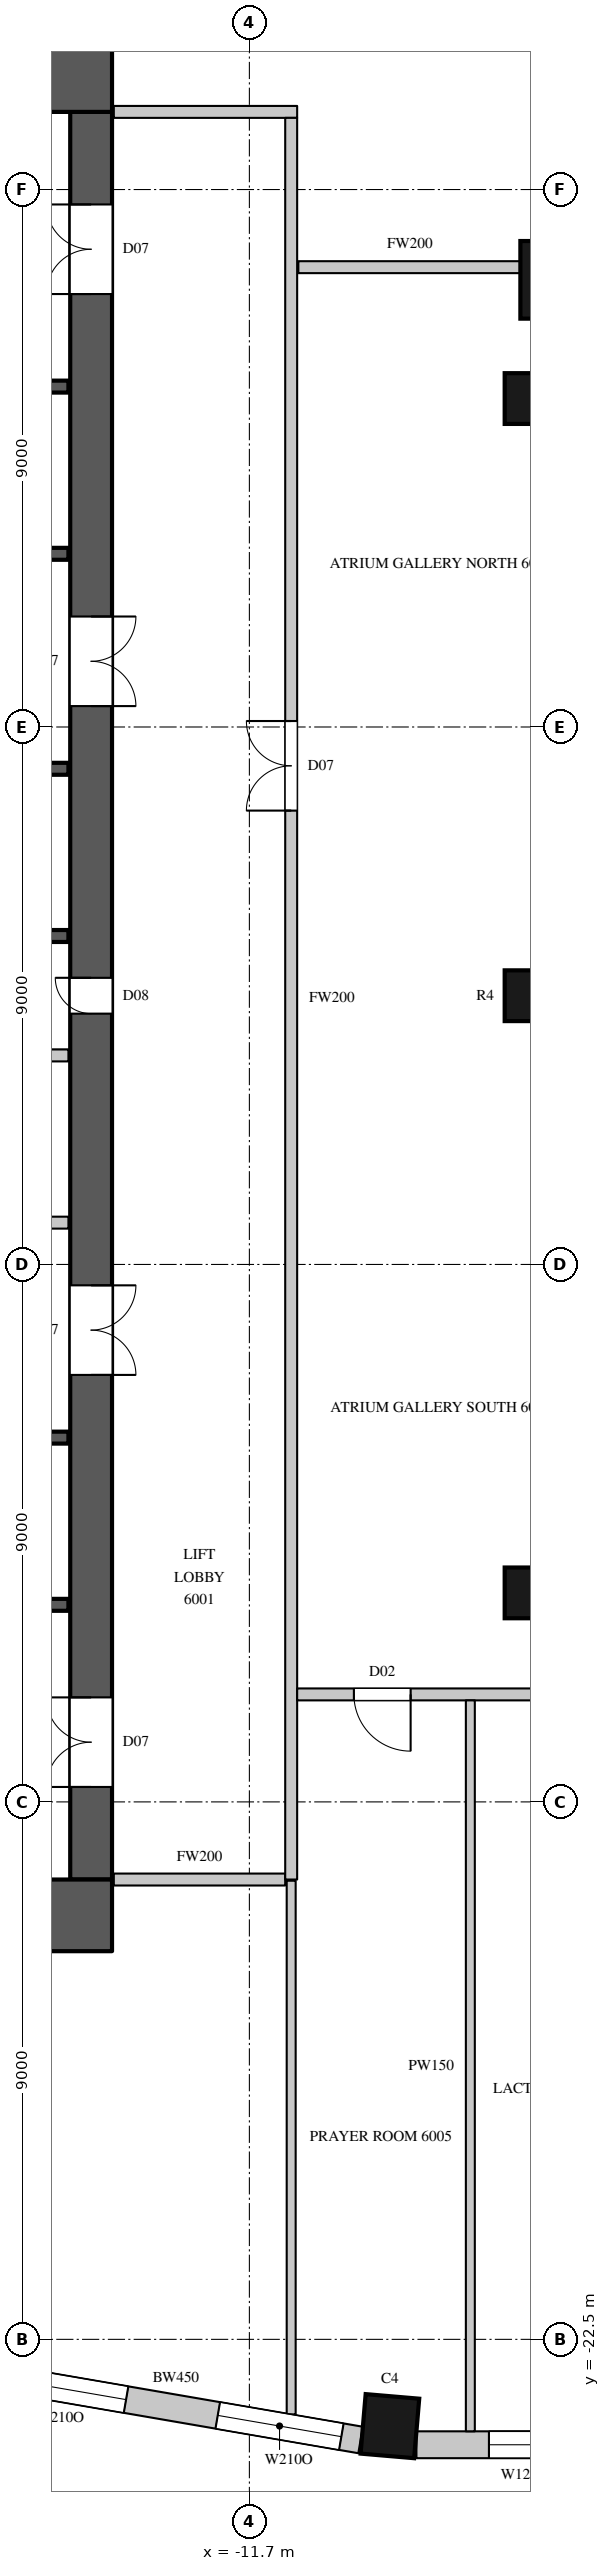
"""IFC4 building model, lengths in metres.
Left out: names, types, materials, properties, quantities, classifications, styles, units other than length and angle.
Written with IfcOpenShell. Run it as: python <this file> out.ifc"""

import sys

from ifc_helpers import new_model, si_unit, direction, frame, frame_2d, origin, origin_2d, place, context, subcontext, project, spatial, rectangle, circle, extrude, element, fill, save


model = new_model("IFC4")
c1 = context("Model", 3, precision=1e-05, world=origin(), true_north=direction((0.0, 1.0)))
c2 = subcontext(c1, "Body", "Model", "MODEL_VIEW")
j1 = project(units=[si_unit("LENGTHUNIT", "METRE"), si_unit("PLANEANGLEUNIT", "RADIAN")], contexts=[c1])
p1 = place(None, origin())
s1 = spatial("IfcSite", under=j1, at=p1, CompositionType="ELEMENT")
p2 = place(p1, origin())
s2 = spatial("IfcBuilding", under=s1, at=p2, CompositionType="ELEMENT")
p3 = place(p2, frame((0.0, 0.0, 268.0)))
s3 = spatial("IfcBuildingStorey", under=s2, at=p3, CompositionType="ELEMENT", Elevation=268.0)
p4 = place(p3, frame((-6.512, 11.988, 0.0), z_axis=(0.0, 0.0, 1.0), x_axis=(1.0, 0.0, 0.0)))
e1 = element("IfcColumn", 1, at=p4, inside=s3, PredefinedType="COLUMN", context=c2, shape_type="SweptSolid", body=[
    extrude(circle(Radius=0.65, at=origin_2d()), origin(), (0.0, 0.0, 1.0), 4.1),
])
p5 = place(p3, frame((-9.347, -23.954, 0.0), z_axis=(0.0, 0.0, 1.0), x_axis=(0.996368206733, -0.085149260784, 0.0)))
e2 = element("IfcColumn", 2, at=p5, inside=s3, PredefinedType="COLUMN", context=c2, shape_type="SweptSolid", body=[
    extrude(rectangle(XDim=0.9, YDim=1.0, at=origin_2d()), origin(), (0.0, 0.0, 1.0), 4.1),
])
for number, where, z_axis, x_axis in (
    (3, (-7.0, -10.0, 0.0), (0.0, 0.0, 1.0), (1.0, 0.0, 0.0)),
    (4, (-7.0, 0.0, 0.0), (0.0, 0.0, 1.0), (1.0, 0.0, 0.0)),
    (5, (-7.0, 10.0, 0.0), (0.0, 0.0, 1.0), (1.0, 0.0, 0.0)),
):
    element("IfcColumn", number, at=place(p3, frame(where, z_axis=z_axis, x_axis=x_axis)), inside=s3, PredefinedType="COLUMN", context=c2, shape_type="SweptSolid", body=[
        extrude(circle(Radius=0.425, at=origin_2d()), origin(), (0.0, 0.0, 1.0), 4.1),
    ])
p6 = place(p3, frame((-16.157, -23.097, 0.0), z_axis=(0.0, 0.0, 1.0), x_axis=(0.985502073964, -0.169663379113, 0.0)))
e6 = element("IfcWall", 6, at=p6, inside=s3, PredefinedType="SOLIDWALL", context=c2, shape_type="SweptSolid", body=[
    extrude(rectangle(XDim=6.412, YDim=0.45, at=frame_2d((3.206, 0.0))), origin(), (0.0, 0.0, 1.0), 3.8),
])
p7 = place(p6, frame((0.327, 0.0, 1.05)))
e7 = element("IfcOpeningElement", 7, at=p7, cuts=e6, PredefinedType="OPENING", context=c2, shape_type="SweptSolid", body=[
    extrude(rectangle(XDim=2.1, YDim=2.4, at=frame_2d((1.05, 1.2))), frame((0.0, 0.235, 0.0), z_axis=(0.0, -1.0, 0.0), x_axis=(1.0, 0.0, 0.0)), (0.0, 0.0, 1.0), 0.47),
])
p8 = place(p6, frame((3.985, 0.0, 1.05)))
e8 = element("IfcOpeningElement", 8, at=p8, cuts=e6, PredefinedType="OPENING", context=c2, shape_type="SweptSolid", body=[
    extrude(rectangle(XDim=2.1, YDim=2.4, at=frame_2d((1.05, 1.2))), frame((0.0, 0.235, 0.0), z_axis=(0.0, -1.0, 0.0), x_axis=(1.0, 0.0, 0.0)), (0.0, 0.0, 1.0), 0.47),
])
p9 = place(p3, frame((-8.903, -24.265, 0.0), z_axis=(0.0, 0.0, 1.0), x_axis=(1.0, 0.0, 0.0)))
e9 = element("IfcWall", 9, at=p9, inside=s3, PredefinedType="SOLIDWALL", context=c2, shape_type="SweptSolid", body=[
    extrude(rectangle(XDim=6.406, YDim=0.45, at=frame_2d((3.203, 0.0))), origin(), (0.0, 0.0, 1.0), 3.8),
])
p10 = place(p9, frame((3.98, 0.0, 1.05)))
e10 = element("IfcOpeningElement", 10, at=p10, cuts=e9, PredefinedType="OPENING", context=c2, shape_type="SweptSolid", body=[
    extrude(rectangle(XDim=2.1, YDim=2.4, at=frame_2d((1.05, 1.2))), frame((0.0, 0.235, 0.0), z_axis=(0.0, -1.0, 0.0), x_axis=(1.0, 0.0, 0.0)), (0.0, 0.0, 1.0), 0.47),
])
p11 = place(p9, frame((1.214, 0.0, 1.05)))
e11 = element("IfcOpeningElement", 11, at=p11, cuts=e9, PredefinedType="OPENING", context=c2, shape_type="SweptSolid", body=[
    extrude(rectangle(XDim=1.2, YDim=2.4, at=frame_2d((0.6, 1.2))), frame((0.0, 0.235, 0.0), z_axis=(0.0, -1.0, 0.0), x_axis=(1.0, 0.0, 0.0)), (0.0, 0.0, 1.0), 0.47),
])
for number, where, z_axis, x_axis in (
    (12, (-30.0, 15.4, 0.0), (0.0, 0.0, 1.0), (1.0, 0.0, 0.0)),
    (13, (-30.0, -15.4, 0.0), (0.0, 0.0, 1.0), (1.0, 0.0, 0.0)),
):
    element("IfcWall", number, at=place(p3, frame(where, z_axis=z_axis, x_axis=x_axis)), inside=s3, PredefinedType="SHEAR", context=c2, shape_type="SweptSolid", body=[
        extrude(rectangle(XDim=16.0, YDim=1.2, at=frame_2d((8.0, 0.0))), origin(), (0.0, 0.0, 1.0), 4.1),
    ])
p12 = place(p3, frame((-14.35, -14.8, 0.0), z_axis=(0.0, 0.0, 1.0), x_axis=(0.0, 1.0, 0.0)))
e14 = element("IfcWall", 14, at=p12, inside=s3, PredefinedType="SHEAR", context=c2, shape_type="SweptSolid", body=[
    extrude(rectangle(XDim=29.6, YDim=0.7, at=frame_2d((14.8, 0.0))), origin(), (0.0, 0.0, 1.0), 4.1),
])
p13 = place(p12, frame((1.55, 0.0, 0.0)))
e15 = element("IfcOpeningElement", 15, at=p13, cuts=e14, PredefinedType="OPENING", context=c2, shape_type="SweptSolid", body=[
    extrude(rectangle(XDim=1.5, YDim=2.4, at=frame_2d((0.75, 1.2))), frame((0.0, 0.36, 0.0), z_axis=(0.0, -1.0, 0.0), x_axis=(1.0, 0.0, 0.0)), (0.0, 0.0, 1.0), 0.72),
])
p14 = place(p12, frame((26.55, 0.0, 0.0)))
e16 = element("IfcOpeningElement", 16, at=p14, cuts=e14, PredefinedType="OPENING", context=c2, shape_type="SweptSolid", body=[
    extrude(rectangle(XDim=1.5, YDim=2.4, at=frame_2d((0.75, 1.2))), frame((0.0, 0.36, 0.0), z_axis=(0.0, -1.0, 0.0), x_axis=(1.0, 0.0, 0.0)), (0.0, 0.0, 1.0), 0.72),
])
p15 = place(p12, frame((8.45, 0.0, 0.0)))
e17 = element("IfcOpeningElement", 17, at=p15, cuts=e14, PredefinedType="OPENING", context=c2, shape_type="SweptSolid", body=[
    extrude(rectangle(XDim=1.5, YDim=2.4, at=frame_2d((0.75, 1.2))), frame((0.0, 0.36, 0.0), z_axis=(0.0, -1.0, 0.0), x_axis=(1.0, 0.0, 0.0)), (0.0, 0.0, 1.0), 0.72),
])
p16 = place(p12, frame((19.65, 0.0, 0.0)))
e18 = element("IfcOpeningElement", 18, at=p16, cuts=e14, PredefinedType="OPENING", context=c2, shape_type="SweptSolid", body=[
    extrude(rectangle(XDim=1.5, YDim=2.4, at=frame_2d((0.75, 1.2))), frame((0.0, 0.36, 0.0), z_axis=(0.0, -1.0, 0.0), x_axis=(1.0, 0.0, 0.0)), (0.0, 0.0, 1.0), 0.72),
])
p17 = place(p12, frame((14.5, 0.0, 0.0)))
e19 = element("IfcOpeningElement", 19, at=p17, cuts=e14, PredefinedType="OPENING", context=c2, shape_type="SweptSolid", body=[
    extrude(rectangle(XDim=0.6, YDim=2.0, at=frame_2d((0.3, 1.0))), frame((0.0, 0.36, 0.0), z_axis=(0.0, -1.0, 0.0), x_axis=(1.0, 0.0, 0.0)), (0.0, 0.0, 1.0), 0.72),
])
p18 = place(p3, frame((-29.27, -3.8, 0.0), z_axis=(0.0, 0.0, 1.0), x_axis=(1.0, 0.0, 0.0)))
e20 = element("IfcWall", 20, at=p18, inside=s3, PredefinedType="PARTITIONING", context=c2, shape_type="SweptSolid", body=[
    extrude(rectangle(XDim=14.54, YDim=0.2, at=frame_2d((7.27, 0.0))), origin(), (0.0, 0.0, 1.0), 3.8),
])
p19 = place(p18, frame((0.8, 0.0, 0.0)))
e21 = element("IfcOpeningElement", 21, at=p19, cuts=e20, PredefinedType="OPENING", context=c2, shape_type="SweptSolid", body=[
    extrude(rectangle(XDim=0.9, YDim=2.2, at=frame_2d((0.45, 1.1))), frame((0.0, 0.11, 0.0), z_axis=(0.0, -1.0, 0.0), x_axis=(1.0, 0.0, 0.0)), (0.0, 0.0, 1.0), 0.22),
])
p20 = place(p18, frame((3.8, 0.0, 0.0)))
e22 = element("IfcOpeningElement", 22, at=p20, cuts=e20, PredefinedType="OPENING", context=c2, shape_type="SweptSolid", body=[
    extrude(rectangle(XDim=0.9, YDim=2.2, at=frame_2d((0.45, 1.1))), frame((0.0, 0.11, 0.0), z_axis=(0.0, -1.0, 0.0), x_axis=(1.0, 0.0, 0.0)), (0.0, 0.0, 1.0), 0.22),
])
p21 = place(p18, frame((8.25, 0.0, 0.0)))
e23 = element("IfcOpeningElement", 23, at=p21, cuts=e20, PredefinedType="OPENING", context=c2, shape_type="SweptSolid", body=[
    extrude(rectangle(XDim=0.9, YDim=2.2, at=frame_2d((0.45, 1.1))), frame((0.0, 0.11, 0.0), z_axis=(0.0, -1.0, 0.0), x_axis=(1.0, 0.0, 0.0)), (0.0, 0.0, 1.0), 0.22),
])
p22 = place(p18, frame((12.35, 0.0, 0.0)))
e24 = element("IfcOpeningElement", 24, at=p22, cuts=e20, PredefinedType="OPENING", context=c2, shape_type="SweptSolid", body=[
    extrude(rectangle(XDim=0.9, YDim=2.2, at=frame_2d((0.45, 1.1))), frame((0.0, 0.11, 0.0), z_axis=(0.0, -1.0, 0.0), x_axis=(1.0, 0.0, 0.0)), (0.0, 0.0, 1.0), 0.22),
])
p23 = place(p3, frame((-13.97, -14.8, 0.0), z_axis=(0.0, 0.0, 1.0), x_axis=(1.0, 0.0, 0.0)))
e25 = element("IfcWall", 25, at=p23, inside=s3, PredefinedType="PARTITIONING", context=c2, shape_type="SweptSolid", body=[
    extrude(rectangle(XDim=2.87, YDim=0.2, at=frame_2d((1.435, 0.0))), origin(), (0.0, 0.0, 1.0), 3.8),
])
p24 = place(p3, frame((-13.97, 14.8, 0.0), z_axis=(0.0, 0.0, 1.0), x_axis=(1.0, 0.0, 0.0)))
e26 = element("IfcWall", 26, at=p24, inside=s3, PredefinedType="PARTITIONING", context=c2, shape_type="SweptSolid", body=[
    extrude(rectangle(XDim=3.07, YDim=0.2, at=frame_2d((1.535, 0.0))), origin(), (0.0, 0.0, 1.0), 3.8),
])
p25 = place(p3, frame((-11.0, -14.8, 0.0), z_axis=(0.0, 0.0, 1.0), x_axis=(0.0, 1.0, 0.0)))
e27 = element("IfcWall", 27, at=p25, inside=s3, PredefinedType="PARTITIONING", context=c2, shape_type="SweptSolid", body=[
    extrude(rectangle(XDim=29.5, YDim=0.2, at=frame_2d((14.75, 0.0))), origin(), (0.0, 0.0, 1.0), 3.8),
])
p26 = place(p25, frame((17.9, 0.0, 0.0)))
e28 = element("IfcOpeningElement", 28, at=p26, cuts=e27, PredefinedType="OPENING", context=c2, shape_type="SweptSolid", body=[
    extrude(rectangle(XDim=1.5, YDim=2.4, at=frame_2d((0.75, 1.2))), frame((0.0, 0.11, 0.0), z_axis=(0.0, -1.0, 0.0), x_axis=(1.0, 0.0, 0.0)), (0.0, 0.0, 1.0), 0.22),
])
p27 = place(p3, frame((-10.9, -11.7, 0.0), z_axis=(0.0, 0.0, 1.0), x_axis=(1.0, 0.0, 0.0)))
e29 = element("IfcWall", 29, at=p27, inside=s3, PredefinedType="PARTITIONING", context=c2, shape_type="SweptSolid", body=[
    extrude(rectangle(XDim=21.5, YDim=0.2, at=frame_2d((10.75, 0.0))), origin(), (0.0, 0.0, 1.0), 3.8),
])
p28 = place(p27, frame((0.95, 0.0, 0.0)))
e30 = element("IfcOpeningElement", 30, at=p28, cuts=e29, PredefinedType="OPENING", context=c2, shape_type="SweptSolid", body=[
    extrude(rectangle(XDim=0.95, YDim=2.2, at=frame_2d((0.475, 1.1))), frame((0.0, 0.11, 0.0), z_axis=(0.0, -1.0, 0.0), x_axis=(1.0, 0.0, 0.0)), (0.0, 0.0, 1.0), 0.22),
])
p29 = place(p27, frame((4.2, 0.0, 0.0)))
e31 = element("IfcOpeningElement", 31, at=p29, cuts=e29, PredefinedType="OPENING", context=c2, shape_type="SweptSolid", body=[
    extrude(rectangle(XDim=0.9, YDim=2.2, at=frame_2d((0.45, 1.1))), frame((0.0, 0.11, 0.0), z_axis=(0.0, -1.0, 0.0), x_axis=(1.0, 0.0, 0.0)), (0.0, 0.0, 1.0), 0.22),
])
p30 = place(p27, frame((6.85, 0.0, 0.0)))
e32 = element("IfcOpeningElement", 32, at=p30, cuts=e29, PredefinedType="OPENING", context=c2, shape_type="SweptSolid", body=[
    extrude(rectangle(XDim=1.1, YDim=2.4, at=frame_2d((0.55, 1.2))), frame((0.0, 0.11, 0.0), z_axis=(0.0, -1.0, 0.0), x_axis=(1.0, 0.0, 0.0)), (0.0, 0.0, 1.0), 0.22),
])
p31 = place(p27, frame((9.95, 0.0, 0.0)))
e33 = element("IfcOpeningElement", 33, at=p31, cuts=e29, PredefinedType="OPENING", context=c2, shape_type="SweptSolid", body=[
    extrude(rectangle(XDim=1.1, YDim=2.4, at=frame_2d((0.55, 1.2))), frame((0.0, 0.11, 0.0), z_axis=(0.0, -1.0, 0.0), x_axis=(1.0, 0.0, 0.0)), (0.0, 0.0, 1.0), 0.22),
])
p32 = place(p3, frame((-10.88, 12.2, 0.0), z_axis=(0.0, 0.0, 1.0), x_axis=(1.0, 0.0, 0.0)))
e34 = element("IfcWall", 34, at=p32, inside=s3, PredefinedType="PARTITIONING", context=c2, shape_type="SweptSolid", body=[
    extrude(rectangle(XDim=3.736, YDim=0.2, at=frame_2d((1.868, 0.0))), origin(), (0.0, 0.0, 1.0), 3.8),
])
p33 = place(p3, frame((-11.0, -23.757, 0.0), z_axis=(0.0, 0.0, 1.0), x_axis=(0.0, 1.0, 0.0)))
e35 = element("IfcWall", 35, at=p33, inside=s3, PredefinedType="PARTITIONING", context=c2, shape_type="SweptSolid", body=[
    extrude(rectangle(XDim=8.937, YDim=0.15, at=frame_2d((4.468, 0.0))), origin(), (0.0, 0.0, 1.0), 3.8),
])
p34 = place(p3, frame((-8.0, -24.04, 0.0), z_axis=(0.0, 0.0, 1.0), x_axis=(0.0, 1.0, 0.0)))
e36 = element("IfcWall", 36, at=p34, inside=s3, PredefinedType="PARTITIONING", context=c2, shape_type="SweptSolid", body=[
    extrude(rectangle(XDim=12.24, YDim=0.15, at=frame_2d((6.12, 0.0))), origin(), (0.0, 0.0, 1.0), 3.8),
])
p35 = place(p3, frame((-29.27, -1.0, 0.0), z_axis=(0.0, 0.0, 1.0), x_axis=(1.0, 0.0, 0.0)))
e37 = element("IfcWall", 37, at=p35, inside=s3, PredefinedType="PARTITIONING", context=c2, shape_type="SweptSolid", body=[
    extrude(rectangle(XDim=14.54, YDim=0.2, at=frame_2d((7.27, 0.0))), origin(), (0.0, 0.0, 1.0), 3.8),
])
p36 = place(p3, frame((-17.92, -10.2, 0.0), z_axis=(0.0, 0.0, 1.0), x_axis=(1.0, 0.0, 0.0)))
e38 = element("IfcWall", 38, at=p36, inside=s3, PredefinedType="SHEAR", context=c2, shape_type="SweptSolid", body=[
    extrude(rectangle(XDim=3.19, YDim=0.2, at=frame_2d((1.595, 0.0))), origin(), (0.0, 0.0, 1.0), 3.8),
])
p37 = place(p36, frame((1.05, 0.0, 0.0)))
e39 = element("IfcOpeningElement", 39, at=p37, cuts=e38, PredefinedType="OPENING", context=c2, shape_type="SweptSolid", body=[
    extrude(rectangle(XDim=1.1, YDim=2.2, at=frame_2d((0.55, 1.1))), frame((0.0, 0.11, 0.0), z_axis=(0.0, -1.0, 0.0), x_axis=(1.0, 0.0, 0.0)), (0.0, 0.0, 1.0), 0.22),
])
for number, where, z_axis, x_axis in (
    (40, (-17.9, -7.4, 0.0), (0.0, 0.0, 1.0), (1.0, 0.0, 0.0)),
    (41, (-17.9, 1.0, 0.0), (0.0, 0.0, 1.0), (1.0, 0.0, 0.0)),
):
    element("IfcWall", number, at=place(p3, frame(where, z_axis=z_axis, x_axis=x_axis)), inside=s3, PredefinedType="SHEAR", context=c2, shape_type="SweptSolid", body=[
        extrude(rectangle(XDim=3.17, YDim=0.2, at=frame_2d((1.585, 0.0))), origin(), (0.0, 0.0, 1.0), 3.8),
    ])
p38 = place(p3, frame((-17.9, 3.8, 0.0), z_axis=(0.0, 0.0, 1.0), x_axis=(1.0, 0.0, 0.0)))
e42 = element("IfcWall", 42, at=p38, inside=s3, PredefinedType="SHEAR", context=c2, shape_type="SweptSolid", body=[
    extrude(rectangle(XDim=3.17, YDim=0.2, at=frame_2d((1.585, 0.0))), origin(), (0.0, 0.0, 1.0), 3.8),
])
p39 = place(p38, frame((1.05, 0.0, 0.0)))
e43 = element("IfcOpeningElement", 43, at=p39, cuts=e42, PredefinedType="OPENING", context=c2, shape_type="SweptSolid", body=[
    extrude(rectangle(XDim=1.1, YDim=2.2, at=frame_2d((0.55, 1.1))), frame((0.0, 0.11, 0.0), z_axis=(0.0, -1.0, 0.0), x_axis=(1.0, 0.0, 0.0)), (0.0, 0.0, 1.0), 0.22),
])
p40 = place(p3, frame((-17.92, 7.4, 0.0), z_axis=(0.0, 0.0, 1.0), x_axis=(1.0, 0.0, 0.0)))
e44 = element("IfcWall", 44, at=p40, inside=s3, PredefinedType="SHEAR", context=c2, shape_type="SweptSolid", body=[
    extrude(rectangle(XDim=3.19, YDim=0.2, at=frame_2d((1.595, 0.0))), origin(), (0.0, 0.0, 1.0), 3.8),
])
p41 = place(p3, frame((-17.92, 10.2, 0.0), z_axis=(0.0, 0.0, 1.0), x_axis=(1.0, 0.0, 0.0)))
e45 = element("IfcWall", 45, at=p41, inside=s3, PredefinedType="SHEAR", context=c2, shape_type="SweptSolid", body=[
    extrude(rectangle(XDim=3.19, YDim=0.2, at=frame_2d((1.595, 0.0))), origin(), (0.0, 0.0, 1.0), 3.8),
])
p42 = place(p41, frame((1.05, 0.0, 0.0)))
e46 = element("IfcOpeningElement", 46, at=p42, cuts=e45, PredefinedType="OPENING", context=c2, shape_type="SweptSolid", body=[
    extrude(rectangle(XDim=1.1, YDim=2.2, at=frame_2d((0.55, 1.1))), frame((0.0, 0.11, 0.0), z_axis=(0.0, -1.0, 0.0), x_axis=(1.0, 0.0, 0.0)), (0.0, 0.0, 1.0), 0.22),
])
p43 = place(p7, origin())
e47 = element("IfcWindow", 47, at=p43, inside=s3, PartitioningType="SINGLE_PANEL", PredefinedType="WINDOW", context=c2, shape_type="SweptSolid", body=[
    extrude(rectangle(XDim=2.1, YDim=2.4, at=frame_2d((1.05, 1.2))), frame((0.0, 0.135, 0.0), z_axis=(0.0, -1.0, 0.0), x_axis=(1.0, 0.0, 0.0)), (0.0, 0.0, 1.0), 0.06),
])
fill(e7, e47)
p44 = place(p8, origin())
e48 = element("IfcWindow", 48, at=p44, inside=s3, PartitioningType="SINGLE_PANEL", PredefinedType="WINDOW", context=c2, shape_type="SweptSolid", body=[
    extrude(rectangle(XDim=2.1, YDim=2.4, at=frame_2d((1.05, 1.2))), frame((0.0, 0.135, 0.0), z_axis=(0.0, -1.0, 0.0), x_axis=(1.0, 0.0, 0.0)), (0.0, 0.0, 1.0), 0.06),
])
fill(e8, e48)
p45 = place(p26, origin())
e49 = element("IfcDoor", 49, at=p45, inside=s3, OperationType="DOUBLE_DOOR_SINGLE_SWING", PredefinedType="DOOR", context=c2, shape_type="SweptSolid", body=[
    extrude(rectangle(XDim=1.5, YDim=2.4, at=frame_2d((0.75, 1.2))), frame((0.0, 0.025, 0.0), z_axis=(0.0, -1.0, 0.0), x_axis=(1.0, 0.0, 0.0)), (0.0, 0.0, 1.0), 0.05),
])
fill(e28, e49)
p46 = place(p28, origin())
e50 = element("IfcDoor", 50, at=p46, inside=s3, OperationType="SINGLE_SWING_LEFT", PredefinedType="DOOR", context=c2, shape_type="SweptSolid", body=[
    extrude(rectangle(XDim=0.95, YDim=2.2, at=frame_2d((0.475, 1.1))), frame((0.0, 0.025, 0.0), z_axis=(0.0, -1.0, 0.0), x_axis=(1.0, 0.0, 0.0)), (0.0, 0.0, 1.0), 0.05),
])
fill(e30, e50)
p47 = place(p13, origin())
e51 = element("IfcDoor", 51, at=p47, inside=s3, OperationType="DOUBLE_DOOR_SINGLE_SWING", PredefinedType="DOOR", context=c2, shape_type="SweptSolid", body=[
    extrude(rectangle(XDim=1.5, YDim=2.4, at=frame_2d((0.75, 1.2))), frame((0.0, 0.345, 0.0), z_axis=(0.0, -1.0, 0.0), x_axis=(1.0, 0.0, 0.0)), (0.0, 0.0, 1.0), 0.05),
])
fill(e15, e51)
p48 = place(p14, origin())
e52 = element("IfcDoor", 52, at=p48, inside=s3, OperationType="DOUBLE_DOOR_SINGLE_SWING", PredefinedType="DOOR", context=c2, shape_type="SweptSolid", body=[
    extrude(rectangle(XDim=1.5, YDim=2.4, at=frame_2d((0.75, 1.2))), frame((0.0, 0.345, 0.0), z_axis=(0.0, -1.0, 0.0), x_axis=(1.0, 0.0, 0.0)), (0.0, 0.0, 1.0), 0.05),
])
fill(e16, e52)
p49 = place(p15, origin())
e53 = element("IfcDoor", 53, at=p49, inside=s3, OperationType="DOUBLE_DOOR_SINGLE_SWING", PredefinedType="DOOR", context=c2, shape_type="SweptSolid", body=[
    extrude(rectangle(XDim=1.5, YDim=2.4, at=frame_2d((0.75, 1.2))), frame((0.0, -0.295, 0.0), z_axis=(0.0, -1.0, 0.0), x_axis=(1.0, 0.0, 0.0)), (0.0, 0.0, 1.0), 0.05),
])
fill(e17, e53)
p50 = place(p16, origin())
e54 = element("IfcDoor", 54, at=p50, inside=s3, OperationType="DOUBLE_DOOR_SINGLE_SWING", PredefinedType="DOOR", context=c2, shape_type="SweptSolid", body=[
    extrude(rectangle(XDim=1.5, YDim=2.4, at=frame_2d((0.75, 1.2))), frame((0.0, -0.295, 0.0), z_axis=(0.0, -1.0, 0.0), x_axis=(1.0, 0.0, 0.0)), (0.0, 0.0, 1.0), 0.05),
])
fill(e18, e54)
p51 = place(p17, origin())
e55 = element("IfcDoor", 55, at=p51, inside=s3, OperationType="SINGLE_SWING_RIGHT", PredefinedType="DOOR", context=c2, shape_type="SweptSolid", body=[
    extrude(rectangle(XDim=0.6, YDim=2.0, at=frame_2d((0.3, 1.0))), frame((0.0, 0.345, 0.0), z_axis=(0.0, -1.0, 0.0), x_axis=(1.0, 0.0, 0.0)), (0.0, 0.0, 1.0), 0.05),
])
fill(e19, e55)
p52 = place(p11, origin())
e56 = element("IfcWindow", 56, at=p52, inside=s3, PartitioningType="SINGLE_PANEL", PredefinedType="WINDOW", context=c2, shape_type="SweptSolid", body=[
    extrude(rectangle(XDim=1.2, YDim=2.4, at=frame_2d((0.6, 1.2))), frame((0.0, 0.135, 0.0), z_axis=(0.0, -1.0, 0.0), x_axis=(1.0, 0.0, 0.0)), (0.0, 0.0, 1.0), 0.06),
])
fill(e11, e56)
save(model, sys.argv[1])
